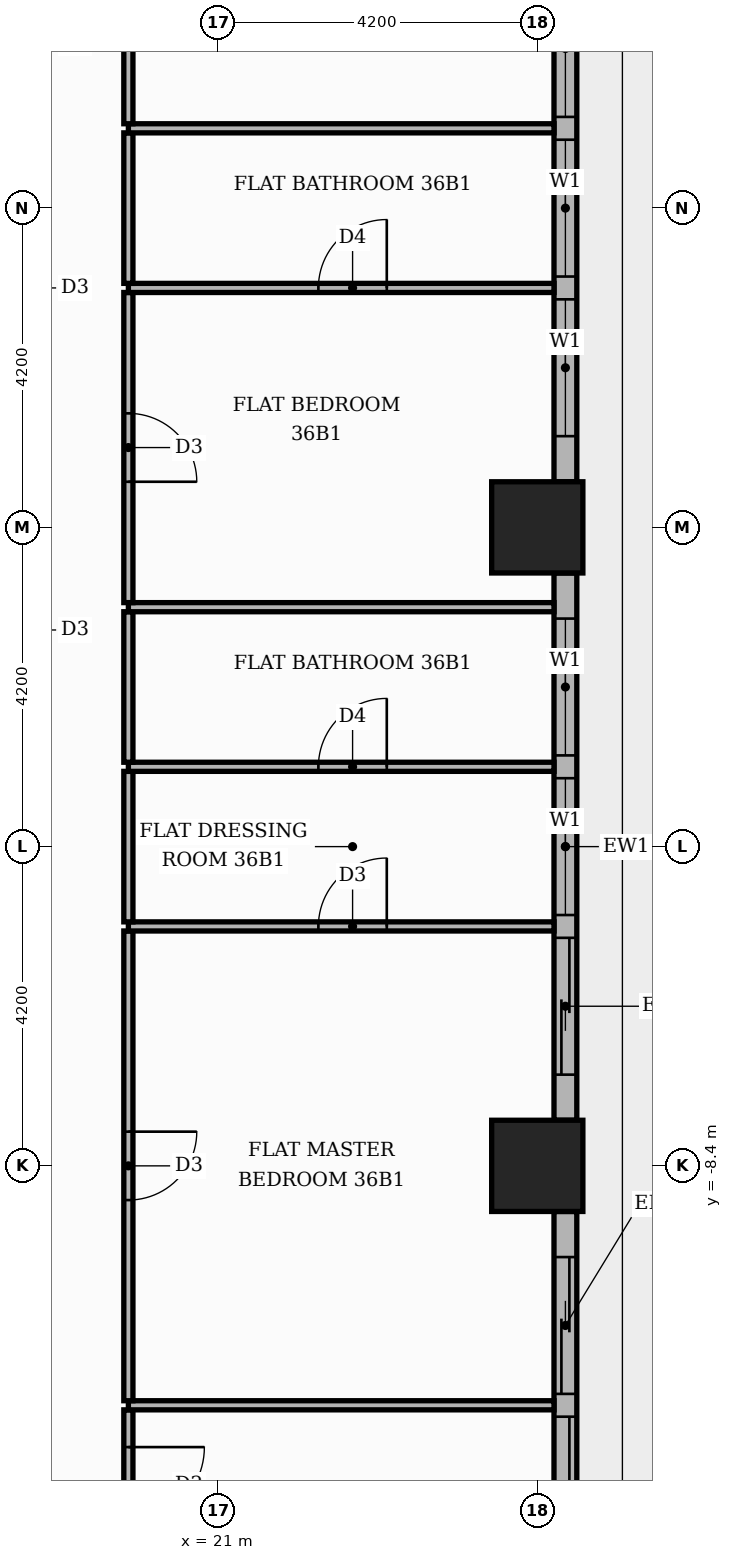
"""IFC4 building model, lengths in metres.
Left out: names, types, materials, properties, quantities, classifications, styles, units other than length and angle.
Written with IfcOpenShell. Run it as: python <this file> out.ifc"""

import sys

from ifc_helpers import new_model, si_unit, direction, frame, frame_2d, origin, origin_2d, place, context, subcontext, project, spatial, rectangle, extrude, element, fill, save


model = new_model("IFC4")
c1 = context("Model", 3, precision=1e-05, world=origin(), true_north=direction((0.0, 1.0)))
c2 = subcontext(c1, "Body", "Model", "MODEL_VIEW")
j1 = project(units=[si_unit("LENGTHUNIT", "METRE"), si_unit("PLANEANGLEUNIT", "RADIAN")], contexts=[c1])
p1 = place(None, origin())
s1 = spatial("IfcSite", under=j1, at=p1, CompositionType="ELEMENT")
p2 = place(p1, origin())
s2 = spatial("IfcBuilding", under=s1, at=p2, CompositionType="ELEMENT")
p3 = place(p2, frame((0.0, 0.0, 153.3)))
s3 = spatial("IfcBuildingStorey", under=s2, at=p3, CompositionType="ELEMENT", Elevation=153.3)
for number, where, z_axis, x_axis in (
    (1, (25.2, 0.0, 0.0), (0.0, 0.0, 1.0), (1.0, 0.0, 0.0)),
    (2, (25.2, -8.4, 0.0), (0.0, 0.0, 1.0), (1.0, 0.0, 0.0)),
):
    element("IfcColumn", number, at=place(p3, frame(where, z_axis=z_axis, x_axis=x_axis)), inside=s3, PredefinedType="COLUMN", context=c2, shape_type="SweptSolid", body=[
        extrude(rectangle(XDim=1.2, YDim=1.2, at=origin_2d()), origin(), (0.0, 0.0, 1.0), 3.9),
    ])
p4 = place(p3, frame((25.57, -16.2, 0.0), z_axis=(0.0, 0.0, 1.0), x_axis=(0.0, 1.0, 0.0)))
e3 = element("IfcWall", 3, at=p4, inside=s3, PredefinedType="STANDARD", context=c2, shape_type="SweptSolid", body=[
    extrude(rectangle(XDim=7.2, YDim=0.3, at=frame_2d((3.6, 0.0))), origin(), (0.0, 0.0, 1.0), 3.48),
])
p5 = place(p4, frame((0.6, 0.0, 0.0)))
e4 = element("IfcOpeningElement", 4, at=p5, cuts=e3, PredefinedType="OPENING", context=c2, shape_type="SweptSolid", body=[
    extrude(rectangle(XDim=3.9, YDim=2.4, at=frame_2d((1.95, 1.2))), frame((0.0, 0.16, 0.0), z_axis=(0.0, -1.0, 0.0), x_axis=(1.0, 0.0, 0.0)), (0.0, 0.0, 1.0), 0.32),
])
p6 = place(p4, frame((4.8, 0.0, 0.0)))
e5 = element("IfcOpeningElement", 5, at=p6, cuts=e3, PredefinedType="OPENING", context=c2, shape_type="SweptSolid", body=[
    extrude(rectangle(XDim=1.8, YDim=2.4, at=frame_2d((0.9, 1.2))), frame((0.0, 0.16, 0.0), z_axis=(0.0, -1.0, 0.0), x_axis=(1.0, 0.0, 0.0)), (0.0, 0.0, 1.0), 0.32),
])
p7 = place(p3, frame((25.57, -7.8, 0.0), z_axis=(0.0, 0.0, 1.0), x_axis=(0.0, 1.0, 0.0)))
e6 = element("IfcWall", 6, at=p7, inside=s3, PredefinedType="STANDARD", context=c2, shape_type="SweptSolid", body=[
    extrude(rectangle(XDim=7.2, YDim=0.3, at=frame_2d((3.6, 0.0))), origin(), (0.0, 0.0, 1.0), 3.48),
])
p8 = place(p7, frame((0.6, 0.0, 0.0)))
e7 = element("IfcOpeningElement", 7, at=p8, cuts=e6, PredefinedType="OPENING", context=c2, shape_type="SweptSolid", body=[
    extrude(rectangle(XDim=1.8, YDim=2.4, at=frame_2d((0.9, 1.2))), frame((0.0, 0.16, 0.0), z_axis=(0.0, -1.0, 0.0), x_axis=(1.0, 0.0, 0.0)), (0.0, 0.0, 1.0), 0.32),
])
p9 = place(p7, frame((2.7, 0.0, 0.9)))
e8 = element("IfcOpeningElement", 8, at=p9, cuts=e6, PredefinedType="OPENING", context=c2, shape_type="SweptSolid", body=[
    extrude(rectangle(XDim=1.8, YDim=2.1, at=frame_2d((0.9, 1.05))), frame((0.0, 0.16, 0.0), z_axis=(0.0, -1.0, 0.0), x_axis=(1.0, 0.0, 0.0)), (0.0, 0.0, 1.0), 0.32),
])
p10 = place(p7, frame((4.8, 0.0, 0.9)))
e9 = element("IfcOpeningElement", 9, at=p10, cuts=e6, PredefinedType="OPENING", context=c2, shape_type="SweptSolid", body=[
    extrude(rectangle(XDim=1.8, YDim=2.1, at=frame_2d((0.9, 1.05))), frame((0.0, 0.16, 0.0), z_axis=(0.0, -1.0, 0.0), x_axis=(1.0, 0.0, 0.0)), (0.0, 0.0, 1.0), 0.32),
])
p11 = place(p3, frame((25.57, 0.6, 0.0), z_axis=(0.0, 0.0, 1.0), x_axis=(0.0, 1.0, 0.0)))
e10 = element("IfcWall", 10, at=p11, inside=s3, PredefinedType="STANDARD", context=c2, shape_type="SweptSolid", body=[
    extrude(rectangle(XDim=7.2, YDim=0.3, at=frame_2d((3.6, 0.0))), origin(), (0.0, 0.0, 1.0), 3.48),
])
p12 = place(p11, frame((0.6, 0.0, 0.9)))
e11 = element("IfcOpeningElement", 11, at=p12, cuts=e10, PredefinedType="OPENING", context=c2, shape_type="SweptSolid", body=[
    extrude(rectangle(XDim=1.8, YDim=2.1, at=frame_2d((0.9, 1.05))), frame((0.0, 0.16, 0.0), z_axis=(0.0, -1.0, 0.0), x_axis=(1.0, 0.0, 0.0)), (0.0, 0.0, 1.0), 0.32),
])
p13 = place(p11, frame((2.7, 0.0, 0.9)))
e12 = element("IfcOpeningElement", 12, at=p13, cuts=e10, PredefinedType="OPENING", context=c2, shape_type="SweptSolid", body=[
    extrude(rectangle(XDim=1.8, YDim=2.1, at=frame_2d((0.9, 1.05))), frame((0.0, 0.16, 0.0), z_axis=(0.0, -1.0, 0.0), x_axis=(1.0, 0.0, 0.0)), (0.0, 0.0, 1.0), 0.32),
])
p14 = place(p11, frame((4.8, 0.0, 0.9)))
e13 = element("IfcOpeningElement", 13, at=p14, cuts=e10, PredefinedType="OPENING", context=c2, shape_type="SweptSolid", body=[
    extrude(rectangle(XDim=1.8, YDim=2.1, at=frame_2d((0.9, 1.05))), frame((0.0, 0.16, 0.0), z_axis=(0.0, -1.0, 0.0), x_axis=(1.0, 0.0, 0.0)), (0.0, 0.0, 1.0), 0.32),
])
p15 = place(p3, frame((19.82, -13.59, 0.0), z_axis=(0.0, 0.0, 1.0), x_axis=(0.0, 1.0, 0.0)))
e14 = element("IfcWall", 14, at=p15, inside=s3, PredefinedType="PARTITIONING", context=c2, shape_type="SweptSolid", body=[
    extrude(rectangle(XDim=1.98, YDim=0.12, at=frame_2d((0.99, 0.0))), origin(), (0.0, 0.0, 1.0), 3.48),
])
p16 = place(p15, frame((0.49, 0.0, 0.0)))
e15 = element("IfcOpeningElement", 15, at=p16, cuts=e14, PredefinedType="OPENING", context=c2, shape_type="SweptSolid", body=[
    extrude(rectangle(XDim=1.0, YDim=2.1, at=frame_2d((0.5, 1.05))), frame((0.0, 0.07, 0.0), z_axis=(0.0, -1.0, 0.0), x_axis=(1.0, 0.0, 0.0)), (0.0, 0.0, 1.0), 0.14),
])
p17 = place(p3, frame((19.82, -11.55, 0.0), z_axis=(0.0, 0.0, 1.0), x_axis=(1.0, 0.0, 0.0)))
e16 = element("IfcWall", 16, at=p17, inside=s3, PredefinedType="PARTITIONING", context=c2, shape_type="SweptSolid", body=[
    extrude(rectangle(XDim=5.6, YDim=0.12, at=frame_2d((2.8, 0.0))), origin(), (0.0, 0.0, 1.0), 3.48),
])
p18 = place(p3, frame((19.82, -11.49, 0.0), z_axis=(0.0, 0.0, 1.0), x_axis=(0.0, 1.0, 0.0)))
e17 = element("IfcWall", 17, at=p18, inside=s3, PredefinedType="PARTITIONING", context=c2, shape_type="SweptSolid", body=[
    extrude(rectangle(XDim=6.18, YDim=0.12, at=frame_2d((3.09, 0.0))), origin(), (0.0, 0.0, 1.0), 3.48),
])
p19 = place(p18, frame((2.64, 0.0, 0.0)))
e18 = element("IfcOpeningElement", 18, at=p19, cuts=e17, PredefinedType="OPENING", context=c2, shape_type="SweptSolid", body=[
    extrude(rectangle(XDim=0.9, YDim=2.1, at=frame_2d((0.45, 1.05))), frame((0.0, 0.07, 0.0), z_axis=(0.0, -1.0, 0.0), x_axis=(1.0, 0.0, 0.0)), (0.0, 0.0, 1.0), 0.14),
])
p20 = place(p3, frame((19.82, -5.25, 0.0), z_axis=(0.0, 0.0, 1.0), x_axis=(1.0, 0.0, 0.0)))
e19 = element("IfcWall", 19, at=p20, inside=s3, PredefinedType="PARTITIONING", context=c2, shape_type="SweptSolid", body=[
    extrude(rectangle(XDim=5.6, YDim=0.12, at=frame_2d((2.8, 0.0))), origin(), (0.0, 0.0, 1.0), 3.48),
])
p21 = place(p20, frame((2.5, 0.0, 0.0)))
e20 = element("IfcOpeningElement", 20, at=p21, cuts=e19, PredefinedType="OPENING", context=c2, shape_type="SweptSolid", body=[
    extrude(rectangle(XDim=0.9, YDim=2.1, at=frame_2d((0.45, 1.05))), frame((0.0, 0.07, 0.0), z_axis=(0.0, -1.0, 0.0), x_axis=(1.0, 0.0, 0.0)), (0.0, 0.0, 1.0), 0.14),
])
p22 = place(p3, frame((19.82, -5.19, 0.0), z_axis=(0.0, 0.0, 1.0), x_axis=(0.0, 1.0, 0.0)))
e21 = element("IfcWall", 21, at=p22, inside=s3, PredefinedType="PARTITIONING", context=c2, shape_type="SweptSolid", body=[
    extrude(rectangle(XDim=1.98, YDim=0.12, at=frame_2d((0.99, 0.0))), origin(), (0.0, 0.0, 1.0), 3.48),
])
p23 = place(p3, frame((19.82, -3.15, 0.0), z_axis=(0.0, 0.0, 1.0), x_axis=(1.0, 0.0, 0.0)))
e22 = element("IfcWall", 22, at=p23, inside=s3, PredefinedType="PARTITIONING", context=c2, shape_type="SweptSolid", body=[
    extrude(rectangle(XDim=5.6, YDim=0.12, at=frame_2d((2.8, 0.0))), origin(), (0.0, 0.0, 1.0), 3.48),
])
p24 = place(p23, frame((2.5, 0.0, 0.0)))
e23 = element("IfcOpeningElement", 23, at=p24, cuts=e22, PredefinedType="OPENING", context=c2, shape_type="SweptSolid", body=[
    extrude(rectangle(XDim=0.9, YDim=2.1, at=frame_2d((0.45, 1.05))), frame((0.0, 0.07, 0.0), z_axis=(0.0, -1.0, 0.0), x_axis=(1.0, 0.0, 0.0)), (0.0, 0.0, 1.0), 0.14),
])
p25 = place(p3, frame((19.82, -3.09, 0.0), z_axis=(0.0, 0.0, 1.0), x_axis=(0.0, 1.0, 0.0)))
e24 = element("IfcWall", 24, at=p25, inside=s3, PredefinedType="PARTITIONING", context=c2, shape_type="SweptSolid", body=[
    extrude(rectangle(XDim=1.98, YDim=0.12, at=frame_2d((0.99, 0.0))), origin(), (0.0, 0.0, 1.0), 3.48),
])
p26 = place(p3, frame((19.82, -1.05, 0.0), z_axis=(0.0, 0.0, 1.0), x_axis=(1.0, 0.0, 0.0)))
e25 = element("IfcWall", 25, at=p26, inside=s3, PredefinedType="PARTITIONING", context=c2, shape_type="SweptSolid", body=[
    extrude(rectangle(XDim=5.6, YDim=0.12, at=frame_2d((2.8, 0.0))), origin(), (0.0, 0.0, 1.0), 3.48),
])
p27 = place(p3, frame((19.82, -0.99, 0.0), z_axis=(0.0, 0.0, 1.0), x_axis=(0.0, 1.0, 0.0)))
e26 = element("IfcWall", 26, at=p27, inside=s3, PredefinedType="PARTITIONING", context=c2, shape_type="SweptSolid", body=[
    extrude(rectangle(XDim=4.08, YDim=0.12, at=frame_2d((2.04, 0.0))), origin(), (0.0, 0.0, 1.0), 3.48),
])
p28 = place(p27, frame((1.59, 0.0, 0.0)))
e27 = element("IfcOpeningElement", 27, at=p28, cuts=e26, PredefinedType="OPENING", context=c2, shape_type="SweptSolid", body=[
    extrude(rectangle(XDim=0.9, YDim=2.1, at=frame_2d((0.45, 1.05))), frame((0.0, 0.07, 0.0), z_axis=(0.0, -1.0, 0.0), x_axis=(1.0, 0.0, 0.0)), (0.0, 0.0, 1.0), 0.14),
])
p29 = place(p3, frame((19.82, 3.15, 0.0), z_axis=(0.0, 0.0, 1.0), x_axis=(1.0, 0.0, 0.0)))
e28 = element("IfcWall", 28, at=p29, inside=s3, PredefinedType="PARTITIONING", context=c2, shape_type="SweptSolid", body=[
    extrude(rectangle(XDim=5.6, YDim=0.12, at=frame_2d((2.8, 0.0))), origin(), (0.0, 0.0, 1.0), 3.48),
])
p30 = place(p29, frame((2.5, 0.0, 0.0)))
e29 = element("IfcOpeningElement", 29, at=p30, cuts=e28, PredefinedType="OPENING", context=c2, shape_type="SweptSolid", body=[
    extrude(rectangle(XDim=0.9, YDim=2.1, at=frame_2d((0.45, 1.05))), frame((0.0, 0.07, 0.0), z_axis=(0.0, -1.0, 0.0), x_axis=(1.0, 0.0, 0.0)), (0.0, 0.0, 1.0), 0.14),
])
p31 = place(p3, frame((19.82, 3.21, 0.0), z_axis=(0.0, 0.0, 1.0), x_axis=(0.0, 1.0, 0.0)))
e30 = element("IfcWall", 30, at=p31, inside=s3, PredefinedType="PARTITIONING", context=c2, shape_type="SweptSolid", body=[
    extrude(rectangle(XDim=1.98, YDim=0.12, at=frame_2d((0.99, 0.0))), origin(), (0.0, 0.0, 1.0), 3.48),
])
p32 = place(p3, frame((19.82, 5.25, 0.0), z_axis=(0.0, 0.0, 1.0), x_axis=(1.0, 0.0, 0.0)))
e31 = element("IfcWall", 31, at=p32, inside=s3, PredefinedType="PARTITIONING", context=c2, shape_type="SweptSolid", body=[
    extrude(rectangle(XDim=5.6, YDim=0.12, at=frame_2d((2.8, 0.0))), origin(), (0.0, 0.0, 1.0), 3.48),
])
p33 = place(p3, frame((19.82, 5.31, 0.0), z_axis=(0.0, 0.0, 1.0), x_axis=(0.0, 1.0, 0.0)))
e32 = element("IfcWall", 32, at=p33, inside=s3, PredefinedType="PARTITIONING", context=c2, shape_type="SweptSolid", body=[
    extrude(rectangle(XDim=6.18, YDim=0.12, at=frame_2d((3.09, 0.0))), origin(), (0.0, 0.0, 1.0), 3.48),
])
p34 = place(p33, frame((2.64, 0.0, 0.0)))
e33 = element("IfcOpeningElement", 33, at=p34, cuts=e32, PredefinedType="OPENING", context=c2, shape_type="SweptSolid", body=[
    extrude(rectangle(XDim=0.9, YDim=2.1, at=frame_2d((0.45, 1.05))), frame((0.0, 0.07, 0.0), z_axis=(0.0, -1.0, 0.0), x_axis=(1.0, 0.0, 0.0)), (0.0, 0.0, 1.0), 0.14),
])
p35 = place(p5, origin())
e34 = element("IfcDoor", 34, at=p35, inside=s3, OperationType="SLIDING_TO_LEFT", PredefinedType="DOOR", context=c2, shape_type="SweptSolid", body=[
    extrude(rectangle(XDim=3.9, YDim=2.4, at=frame_2d((1.95, 1.2))), frame((0.0, 0.025, 0.0), z_axis=(0.0, -1.0, 0.0), x_axis=(1.0, 0.0, 0.0)), (0.0, 0.0, 1.0), 0.05),
])
fill(e4, e34)
p36 = place(p6, origin())
e35 = element("IfcDoor", 35, at=p36, inside=s3, OperationType="SLIDING_TO_RIGHT", PredefinedType="DOOR", context=c2, shape_type="SweptSolid", body=[
    extrude(rectangle(XDim=1.8, YDim=2.4, at=frame_2d((0.9, 1.2))), frame((0.0, 0.025, 0.0), z_axis=(0.0, -1.0, 0.0), x_axis=(1.0, 0.0, 0.0)), (0.0, 0.0, 1.0), 0.05),
])
fill(e5, e35)
p37 = place(p8, origin())
e36 = element("IfcDoor", 36, at=p37, inside=s3, OperationType="SLIDING_TO_LEFT", PredefinedType="DOOR", context=c2, shape_type="SweptSolid", body=[
    extrude(rectangle(XDim=1.8, YDim=2.4, at=frame_2d((0.9, 1.2))), frame((0.0, 0.025, 0.0), z_axis=(0.0, -1.0, 0.0), x_axis=(1.0, 0.0, 0.0)), (0.0, 0.0, 1.0), 0.05),
])
fill(e7, e36)
p38 = place(p9, origin())
e37 = element("IfcWindow", 37, at=p38, inside=s3, PartitioningType="SINGLE_PANEL", PredefinedType="WINDOW", context=c2, shape_type="SweptSolid", body=[
    extrude(rectangle(XDim=1.8, YDim=2.1, at=frame_2d((0.9, 1.05))), frame((0.0, 0.03, 0.0), z_axis=(0.0, -1.0, 0.0), x_axis=(1.0, 0.0, 0.0)), (0.0, 0.0, 1.0), 0.06),
])
fill(e8, e37)
p39 = place(p10, origin())
e38 = element("IfcWindow", 38, at=p39, inside=s3, PartitioningType="SINGLE_PANEL", PredefinedType="WINDOW", context=c2, shape_type="SweptSolid", body=[
    extrude(rectangle(XDim=1.8, YDim=2.1, at=frame_2d((0.9, 1.05))), frame((0.0, 0.03, 0.0), z_axis=(0.0, -1.0, 0.0), x_axis=(1.0, 0.0, 0.0)), (0.0, 0.0, 1.0), 0.06),
])
fill(e9, e38)
p40 = place(p12, origin())
e39 = element("IfcWindow", 39, at=p40, inside=s3, PartitioningType="SINGLE_PANEL", PredefinedType="WINDOW", context=c2, shape_type="SweptSolid", body=[
    extrude(rectangle(XDim=1.8, YDim=2.1, at=frame_2d((0.9, 1.05))), frame((0.0, 0.03, 0.0), z_axis=(0.0, -1.0, 0.0), x_axis=(1.0, 0.0, 0.0)), (0.0, 0.0, 1.0), 0.06),
])
fill(e11, e39)
p41 = place(p13, origin())
e40 = element("IfcWindow", 40, at=p41, inside=s3, PartitioningType="SINGLE_PANEL", PredefinedType="WINDOW", context=c2, shape_type="SweptSolid", body=[
    extrude(rectangle(XDim=1.8, YDim=2.1, at=frame_2d((0.9, 1.05))), frame((0.0, 0.03, 0.0), z_axis=(0.0, -1.0, 0.0), x_axis=(1.0, 0.0, 0.0)), (0.0, 0.0, 1.0), 0.06),
])
fill(e12, e40)
p42 = place(p14, origin())
e41 = element("IfcWindow", 41, at=p42, inside=s3, PartitioningType="SINGLE_PANEL", PredefinedType="WINDOW", context=c2, shape_type="SweptSolid", body=[
    extrude(rectangle(XDim=1.8, YDim=2.1, at=frame_2d((0.9, 1.05))), frame((0.0, 0.03, 0.0), z_axis=(0.0, -1.0, 0.0), x_axis=(1.0, 0.0, 0.0)), (0.0, 0.0, 1.0), 0.06),
])
fill(e13, e41)
p43 = place(p16, frame((1.0, 0.0, 0.0), z_axis=(0.0, 0.0, 1.0), x_axis=(-1.0, 0.0, 0.0)))
e42 = element("IfcDoor", 42, at=p43, inside=s3, OperationType="SINGLE_SWING_RIGHT", PredefinedType="DOOR", context=c2, shape_type="SweptSolid", body=[
    extrude(rectangle(XDim=1.0, YDim=2.1, at=frame_2d((0.5, 1.05))), frame((0.0, 0.025, 0.0), z_axis=(0.0, -1.0, 0.0), x_axis=(1.0, 0.0, 0.0)), (0.0, 0.0, 1.0), 0.05),
])
fill(e15, e42)
p44 = place(p19, frame((0.9, 0.0, 0.0), z_axis=(0.0, 0.0, 1.0), x_axis=(-1.0, 0.0, 0.0)))
e43 = element("IfcDoor", 43, at=p44, inside=s3, OperationType="SINGLE_SWING_RIGHT", PredefinedType="DOOR", context=c2, shape_type="SweptSolid", body=[
    extrude(rectangle(XDim=0.9, YDim=2.1, at=frame_2d((0.45, 1.05))), frame((0.0, 0.025, 0.0), z_axis=(0.0, -1.0, 0.0), x_axis=(1.0, 0.0, 0.0)), (0.0, 0.0, 1.0), 0.05),
])
fill(e18, e43)
p45 = place(p21, origin())
e44 = element("IfcDoor", 44, at=p45, inside=s3, OperationType="SINGLE_SWING_RIGHT", PredefinedType="DOOR", context=c2, shape_type="SweptSolid", body=[
    extrude(rectangle(XDim=0.9, YDim=2.1, at=frame_2d((0.45, 1.05))), frame((0.0, 0.025, 0.0), z_axis=(0.0, -1.0, 0.0), x_axis=(1.0, 0.0, 0.0)), (0.0, 0.0, 1.0), 0.05),
])
fill(e20, e44)
p46 = place(p24, origin())
e45 = element("IfcDoor", 45, at=p46, inside=s3, OperationType="SINGLE_SWING_RIGHT", PredefinedType="DOOR", context=c2, shape_type="SweptSolid", body=[
    extrude(rectangle(XDim=0.9, YDim=2.1, at=frame_2d((0.45, 1.05))), frame((0.0, 0.025, 0.0), z_axis=(0.0, -1.0, 0.0), x_axis=(1.0, 0.0, 0.0)), (0.0, 0.0, 1.0), 0.05),
])
fill(e23, e45)
p47 = place(p28, frame((0.9, 0.0, 0.0), z_axis=(0.0, 0.0, 1.0), x_axis=(-1.0, 0.0, 0.0)))
e46 = element("IfcDoor", 46, at=p47, inside=s3, OperationType="SINGLE_SWING_LEFT", PredefinedType="DOOR", context=c2, shape_type="SweptSolid", body=[
    extrude(rectangle(XDim=0.9, YDim=2.1, at=frame_2d((0.45, 1.05))), frame((0.0, 0.025, 0.0), z_axis=(0.0, -1.0, 0.0), x_axis=(1.0, 0.0, 0.0)), (0.0, 0.0, 1.0), 0.05),
])
fill(e27, e46)
p48 = place(p30, origin())
e47 = element("IfcDoor", 47, at=p48, inside=s3, OperationType="SINGLE_SWING_RIGHT", PredefinedType="DOOR", context=c2, shape_type="SweptSolid", body=[
    extrude(rectangle(XDim=0.9, YDim=2.1, at=frame_2d((0.45, 1.05))), frame((0.0, 0.025, 0.0), z_axis=(0.0, -1.0, 0.0), x_axis=(1.0, 0.0, 0.0)), (0.0, 0.0, 1.0), 0.05),
])
fill(e29, e47)
save(model, sys.argv[1])
